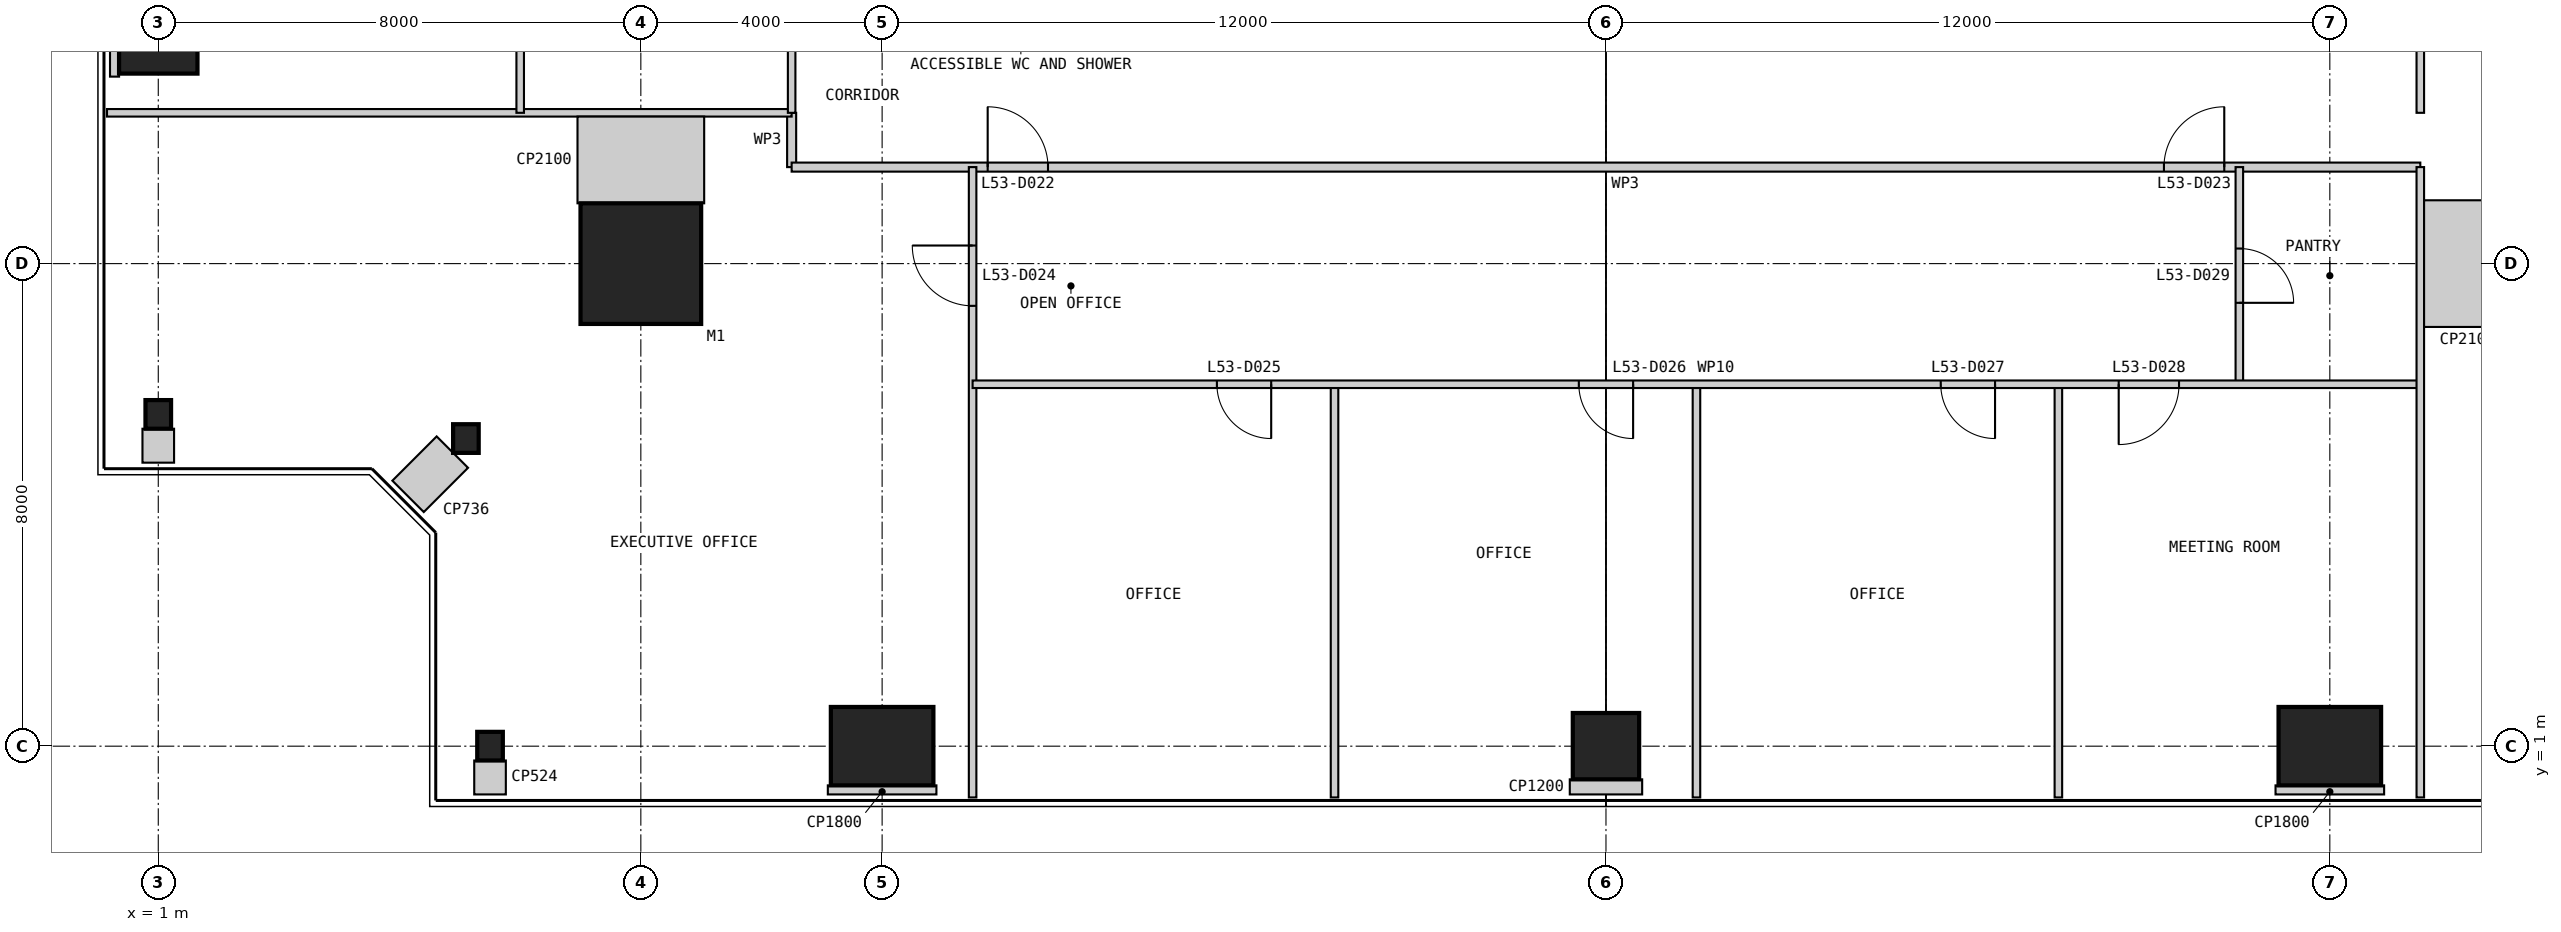
"""IFC4 building model, lengths in metres.
Left out: names, types, materials, properties, quantities, classifications, styles, units other than length and angle.
Written with IfcOpenShell. Run it as: python <this file> out.ifc"""

import sys

from ifc_helpers import new_model, si_unit, direction, frame, frame_2d, origin, origin_2d, place, context, subcontext, project, spatial, rectangle, i_section, extrude, element, fill, save


model = new_model("IFC4")
c1 = context("Model", 3, precision=1e-05, world=origin(), true_north=direction((0.0, 1.0)))
c2 = subcontext(c1, "Body", "Model", "MODEL_VIEW")
j1 = project(units=[si_unit("LENGTHUNIT", "METRE"), si_unit("PLANEANGLEUNIT", "RADIAN")], contexts=[c1])
p1 = place(None, origin())
s1 = spatial("IfcSite", under=j1, at=p1, CompositionType="ELEMENT")
p2 = place(p1, origin())
s2 = spatial("IfcBuilding", under=s1, at=p2, CompositionType="ELEMENT")
p3 = place(p2, frame((0.0, 0.0, 225.8)))
s3 = spatial("IfcBuildingStorey", under=s2, at=p3, CompositionType="ELEMENT", Elevation=225.8)
p4 = place(p3, frame((9.0, 9.0, 0.0), z_axis=(0.0, 0.0, 1.0), x_axis=(1.0, 0.0, 0.0)))
e1 = element("IfcColumn", 1, at=p4, inside=s3, PredefinedType="COLUMN", context=c2, shape_type="SweptSolid", body=[
    extrude(rectangle(XDim=2.0, YDim=2.0, at=origin_2d()), origin(), (0.0, 0.0, 1.0), 4.0),
])
p5 = place(p3, frame((6.5, 1.0, 0.0), z_axis=(0.0, 0.0, 1.0), x_axis=(1.0, 0.0, 0.0)))
e2 = element("IfcColumn", 2, at=p5, inside=s3, PredefinedType="COLUMN", context=c2, shape_type="SweptSolid", body=[
    extrude(i_section(OverallWidth=0.424, OverallDepth=0.475, WebThickness=0.048, FlangeThickness=0.077, at=origin_2d()), origin(), (0.0, 0.0, 1.0), 4.0),
])
p6 = place(p3, frame((13.0, 1.0, 0.0), z_axis=(0.0, 0.0, 1.0), x_axis=(1.0, 0.0, 0.0)))
e3 = element("IfcColumn", 3, at=p6, inside=s3, PredefinedType="COLUMN", context=c2, shape_type="SweptSolid", body=[
    extrude(rectangle(XDim=1.7, YDim=1.3, at=origin_2d()), origin(), (0.0, 0.0, 1.0), 4.0),
])
p7 = place(p3, frame((25.0, 1.0, 0.0), z_axis=(0.0, 0.0, 1.0), x_axis=(1.0, 0.0, 0.0)))
e4 = element("IfcColumn", 4, at=p7, inside=s3, PredefinedType="COLUMN", context=c2, shape_type="SweptSolid", body=[
    extrude(rectangle(XDim=1.1, YDim=1.1, at=origin_2d()), origin(), (0.0, 0.0, 1.0), 4.0),
])
p8 = place(p3, frame((37.0, 1.0, 0.0), z_axis=(0.0, 0.0, 1.0), x_axis=(1.0, 0.0, 0.0)))
e5 = element("IfcColumn", 5, at=p8, inside=s3, PredefinedType="COLUMN", context=c2, shape_type="SweptSolid", body=[
    extrude(rectangle(XDim=1.7, YDim=1.3, at=origin_2d()), origin(), (0.0, 0.0, 1.0), 4.0),
])
p9 = place(p3, frame((1.0, 13.0, 0.0), z_axis=(0.0, 0.0, 1.0), x_axis=(1.0, 0.0, 0.0)))
e6 = element("IfcColumn", 6, at=p9, inside=s3, PredefinedType="COLUMN", context=c2, shape_type="SweptSolid", body=[
    extrude(rectangle(XDim=1.3, YDim=1.7, at=origin_2d()), origin(), (0.0, 0.0, 1.0), 4.0),
])
for number, where, z_axis, x_axis in (
    (7, (1.0, 6.5, 0.0), (0.0, 0.0, 1.0), (1.0, 0.0, 0.0)),
    (8, (6.1, 6.1, 0.0), (0.0, 0.0, 1.0), (1.0, 0.0, 0.0)),
):
    element("IfcColumn", number, at=place(p3, frame(where, z_axis=z_axis, x_axis=x_axis)), inside=s3, PredefinedType="COLUMN", context=c2, shape_type="SweptSolid", body=[
        extrude(i_section(OverallWidth=0.424, OverallDepth=0.475, WebThickness=0.048, FlangeThickness=0.077, at=origin_2d()), origin(), (0.0, 0.0, 1.0), 4.0),
    ])
p10 = place(p3, frame((11.5, 11.5, 0.0), z_axis=(0.0, 0.0, 1.0), x_axis=(0.0, -1.0, 0.0)))
e9 = element("IfcWall", 9, at=p10, inside=s3, PredefinedType="PARTITIONING", context=c2, shape_type="SweptSolid", body=[
    extrude(rectangle(XDim=0.9, YDim=0.15, at=frame_2d((0.45, 0.0))), origin(), (0.0, 0.0, 1.0), 3.85),
])
p11 = place(p3, frame((11.5, 10.6, 0.0), z_axis=(0.0, 0.0, 1.0), x_axis=(1.0, 0.0, 0.0)))
e10 = element("IfcWall", 10, at=p11, inside=s3, PredefinedType="PARTITIONING", context=c2, shape_type="SweptSolid", body=[
    extrude(rectangle(XDim=27.0, YDim=0.15, at=frame_2d((13.5, 0.0))), origin(), (0.0, 0.0, 1.0), 3.85),
])
p12 = place(p11, frame((3.25, 0.0, 0.0)))
e11 = element("IfcOpeningElement", 11, at=p12, cuts=e10, PredefinedType="OPENING", context=c2, shape_type="SweptSolid", body=[
    extrude(rectangle(XDim=1.0, YDim=2.2, at=frame_2d((0.5, 1.1))), frame((0.0, 0.085, 0.0), z_axis=(0.0, -1.0, 0.0), x_axis=(1.0, 0.0, 0.0)), (0.0, 0.0, 1.0), 0.17),
])
p13 = place(p11, frame((22.75, 0.0, 0.0)))
e12 = element("IfcOpeningElement", 12, at=p13, cuts=e10, PredefinedType="OPENING", context=c2, shape_type="SweptSolid", body=[
    extrude(rectangle(XDim=1.0, YDim=2.2, at=frame_2d((0.5, 1.1))), frame((0.0, 0.085, 0.0), z_axis=(0.0, -1.0, 0.0), x_axis=(1.0, 0.0, 0.0)), (0.0, 0.0, 1.0), 0.17),
])
p14 = place(p3, frame((0.15, 11.5, 0.0), z_axis=(0.0, 0.0, 1.0), x_axis=(1.0, 0.0, 0.0)))
e13 = element("IfcWall", 13, at=p14, inside=s3, PredefinedType="PARTITIONING", context=c2, shape_type="SweptSolid", body=[
    extrude(rectangle(XDim=11.35, YDim=0.125, at=frame_2d((5.675, 0.0))), origin(), (0.0, 0.0, 1.0), 3.85),
])
p15 = place(p3, frame((14.5, 0.15, 0.0), z_axis=(0.0, 0.0, 1.0), x_axis=(0.0, 1.0, 0.0)))
e14 = element("IfcWall", 14, at=p15, inside=s3, PredefinedType="PARTITIONING", context=c2, shape_type="SweptSolid", body=[
    extrude(rectangle(XDim=10.45, YDim=0.125, at=frame_2d((5.225, 0.0))), origin(), (0.0, 0.0, 1.0), 3.85),
])
p16 = place(p15, frame((8.15, 0.0, 0.0)))
e15 = element("IfcOpeningElement", 15, at=p16, cuts=e14, PredefinedType="OPENING", context=c2, shape_type="SweptSolid", body=[
    extrude(rectangle(XDim=1.0, YDim=2.2, at=frame_2d((0.5, 1.1))), frame((0.0, 0.073, 0.0), z_axis=(0.0, -1.0, 0.0), x_axis=(1.0, 0.0, 0.0)), (0.0, 0.0, 1.0), 0.145),
])
for number, where, z_axis, x_axis in (
    (16, (20.5, 0.15, 0.0), (0.0, 0.0, 1.0), (0.0, 1.0, 0.0)),
    (17, (26.5, 0.15, 0.0), (0.0, 0.0, 1.0), (0.0, 1.0, 0.0)),
    (18, (32.5, 0.15, 0.0), (0.0, 0.0, 1.0), (0.0, 1.0, 0.0)),
):
    element("IfcWall", number, at=place(p3, frame(where, z_axis=z_axis, x_axis=x_axis)), inside=s3, PredefinedType="PARTITIONING", context=c2, shape_type="SweptSolid", body=[
        extrude(rectangle(XDim=6.85, YDim=0.125, at=frame_2d((3.425, 0.0))), origin(), (0.0, 0.0, 1.0), 3.85),
    ])
p17 = place(p3, frame((35.5, 7.0, 0.0), z_axis=(0.0, 0.0, 1.0), x_axis=(0.0, 1.0, 0.0)))
e19 = element("IfcWall", 19, at=p17, inside=s3, PredefinedType="PARTITIONING", context=c2, shape_type="SweptSolid", body=[
    extrude(rectangle(XDim=3.6, YDim=0.125, at=frame_2d((1.8, 0.0))), origin(), (0.0, 0.0, 1.0), 3.85),
])
p18 = place(p17, frame((1.35, 0.0, 0.0)))
e20 = element("IfcOpeningElement", 20, at=p18, cuts=e19, PredefinedType="OPENING", context=c2, shape_type="SweptSolid", body=[
    extrude(rectangle(XDim=0.9, YDim=2.2, at=frame_2d((0.45, 1.1))), frame((0.0, 0.073, 0.0), z_axis=(0.0, -1.0, 0.0), x_axis=(1.0, 0.0, 0.0)), (0.0, 0.0, 1.0), 0.145),
])
p19 = place(p3, frame((14.5, 7.0, 0.0), z_axis=(0.0, 0.0, 1.0), x_axis=(1.0, 0.0, 0.0)))
e21 = element("IfcWall", 21, at=p19, inside=s3, PredefinedType="PARTITIONING", context=c2, shape_type="SweptSolid", body=[
    extrude(rectangle(XDim=24.0, YDim=0.125, at=frame_2d((12.0, 0.0))), origin(), (0.0, 0.0, 1.0), 3.85),
])
p20 = place(p19, frame((4.05, 0.0, 0.0)))
e22 = element("IfcOpeningElement", 22, at=p20, cuts=e21, PredefinedType="OPENING", context=c2, shape_type="SweptSolid", body=[
    extrude(rectangle(XDim=0.9, YDim=2.2, at=frame_2d((0.45, 1.1))), frame((0.0, 0.073, 0.0), z_axis=(0.0, -1.0, 0.0), x_axis=(1.0, 0.0, 0.0)), (0.0, 0.0, 1.0), 0.145),
])
p21 = place(p19, frame((10.05, 0.0, 0.0)))
e23 = element("IfcOpeningElement", 23, at=p21, cuts=e21, PredefinedType="OPENING", context=c2, shape_type="SweptSolid", body=[
    extrude(rectangle(XDim=0.9, YDim=2.2, at=frame_2d((0.45, 1.1))), frame((0.0, 0.073, 0.0), z_axis=(0.0, -1.0, 0.0), x_axis=(1.0, 0.0, 0.0)), (0.0, 0.0, 1.0), 0.145),
])
p22 = place(p19, frame((16.05, 0.0, 0.0)))
e24 = element("IfcOpeningElement", 24, at=p22, cuts=e21, PredefinedType="OPENING", context=c2, shape_type="SweptSolid", body=[
    extrude(rectangle(XDim=0.9, YDim=2.2, at=frame_2d((0.45, 1.1))), frame((0.0, 0.073, 0.0), z_axis=(0.0, -1.0, 0.0), x_axis=(1.0, 0.0, 0.0)), (0.0, 0.0, 1.0), 0.145),
])
p23 = place(p19, frame((19.0, 0.0, 0.0)))
e25 = element("IfcOpeningElement", 25, at=p23, cuts=e21, PredefinedType="OPENING", context=c2, shape_type="SweptSolid", body=[
    extrude(rectangle(XDim=1.0, YDim=2.2, at=frame_2d((0.5, 1.1))), frame((0.0, 0.073, 0.0), z_axis=(0.0, -1.0, 0.0), x_axis=(1.0, 0.0, 0.0)), (0.0, 0.0, 1.0), 0.145),
])
p24 = place(p3, frame((38.5, 0.15, 0.0), z_axis=(0.0, 0.0, 1.0), x_axis=(0.0, 1.0, 0.0)))
e26 = element("IfcWall", 26, at=p24, inside=s3, PredefinedType="PARTITIONING", context=c2, shape_type="SweptSolid", body=[
    extrude(rectangle(XDim=10.45, YDim=0.125, at=frame_2d((5.225, 0.0))), origin(), (0.0, 0.0, 1.0), 3.85),
])
p25 = place(p3, frame((38.5, 11.5, 0.0), z_axis=(0.0, 0.0, 1.0), x_axis=(0.0, 1.0, 0.0)))
e27 = element("IfcWall", 27, at=p25, inside=s3, PredefinedType="PARTITIONING", context=c2, shape_type="SweptSolid", body=[
    extrude(rectangle(XDim=3.0, YDim=0.125, at=frame_2d((1.5, 0.0))), origin(), (0.0, 0.0, 1.0), 3.85),
])
p26 = place(p3, frame((7.0, 35.5, 0.0), z_axis=(0.0, 0.0, 1.0), x_axis=(0.0, -1.0, 0.0)))
e28 = element("IfcWall", 28, at=p26, inside=s3, PredefinedType="PARTITIONING", context=c2, shape_type="SweptSolid", body=[
    extrude(rectangle(XDim=24.0, YDim=0.125, at=frame_2d((12.0, 0.0))), origin(), (0.0, 0.0, 1.0), 3.238),
])
p27 = place(p26, frame((4.05, 0.0, 0.0)))
e29 = element("IfcOpeningElement", 29, at=p27, cuts=e28, PredefinedType="OPENING", context=c2, shape_type="SweptSolid", body=[
    extrude(rectangle(XDim=0.9, YDim=2.2, at=frame_2d((0.45, 1.1))), frame((0.0, 0.073, 0.0), z_axis=(0.0, -1.0, 0.0), x_axis=(1.0, 0.0, 0.0)), (0.0, 0.0, 1.0), 0.145),
])
p28 = place(p26, frame((10.05, 0.0, 0.0)))
e30 = element("IfcOpeningElement", 30, at=p28, cuts=e28, PredefinedType="OPENING", context=c2, shape_type="SweptSolid", body=[
    extrude(rectangle(XDim=0.9, YDim=2.2, at=frame_2d((0.45, 1.1))), frame((0.0, 0.073, 0.0), z_axis=(0.0, -1.0, 0.0), x_axis=(1.0, 0.0, 0.0)), (0.0, 0.0, 1.0), 0.145),
])
p29 = place(p26, frame((16.05, 0.0, 0.0)))
e31 = element("IfcOpeningElement", 31, at=p29, cuts=e28, PredefinedType="OPENING", context=c2, shape_type="SweptSolid", body=[
    extrude(rectangle(XDim=0.9, YDim=2.2, at=frame_2d((0.45, 1.1))), frame((0.0, 0.073, 0.0), z_axis=(0.0, -1.0, 0.0), x_axis=(1.0, 0.0, 0.0)), (0.0, 0.0, 1.0), 0.145),
])
p30 = place(p26, frame((19.0, 0.0, 0.0)))
e32 = element("IfcOpeningElement", 32, at=p30, cuts=e28, PredefinedType="OPENING", context=c2, shape_type="SweptSolid", body=[
    extrude(rectangle(XDim=1.0, YDim=2.2, at=frame_2d((0.5, 1.1))), frame((0.0, 0.073, 0.0), z_axis=(0.0, -1.0, 0.0), x_axis=(1.0, 0.0, 0.0)), (0.0, 0.0, 1.0), 0.145),
])
p31 = place(p3, frame((11.5, 14.5, 0.0), z_axis=(0.0, 0.0, 1.0), x_axis=(0.0, -1.0, 0.0)))
e33 = element("IfcWall", 33, at=p31, inside=s3, PredefinedType="PARTITIONING", context=c2, shape_type="SweptSolid", body=[
    extrude(rectangle(XDim=3.0, YDim=0.125, at=frame_2d((1.5, 0.0))), origin(), (0.0, 0.0, 1.0), 3.85),
])
p32 = place(p3, frame((9.0, 11.438, 0.0), z_axis=(0.0, 0.0, 1.0), x_axis=(0.0, -1.0, 0.0)))
e34 = element("IfcWall", 34, at=p32, inside=s3, PredefinedType="PARTITIONING", context=c2, shape_type="SweptSolid", body=[
    extrude(rectangle(XDim=1.438, YDim=2.1, at=frame_2d((0.719, 0.0))), origin(), (0.0, 0.0, 1.0), 3.85),
])
p33 = place(p3, frame((6.5, 0.2, 0.0), z_axis=(0.0, 0.0, 1.0), x_axis=(0.0, 1.0, 0.0)))
e35 = element("IfcWall", 35, at=p33, inside=s3, PredefinedType="PARTITIONING", context=c2, shape_type="SweptSolid", body=[
    extrude(rectangle(XDim=0.562, YDim=0.524, at=frame_2d((0.281, 0.0))), origin(), (0.0, 0.0, 1.0), 3.85),
])
p34 = place(p3, frame((13.0, 0.2, 0.0), z_axis=(0.0, 0.0, 1.0), x_axis=(0.0, 1.0, 0.0)))
e36 = element("IfcWall", 36, at=p34, inside=s3, PredefinedType="PARTITIONING", context=c2, shape_type="SweptSolid", body=[
    extrude(rectangle(XDim=0.15, YDim=1.8, at=frame_2d((0.075, 0.0))), origin(), (0.0, 0.0, 1.0), 3.85),
])
p35 = place(p3, frame((1.0, 5.7, 0.0), z_axis=(0.0, 0.0, 1.0), x_axis=(0.0, 1.0, 0.0)))
e37 = element("IfcWall", 37, at=p35, inside=s3, PredefinedType="PARTITIONING", context=c2, shape_type="SweptSolid", body=[
    extrude(rectangle(XDim=0.562, YDim=0.524, at=frame_2d((0.281, 0.0))), origin(), (0.0, 0.0, 1.0), 3.85),
])
p36 = place(p3, frame((5.141, 5.141, 0.0), z_axis=(0.0, 0.0, 1.0), x_axis=(0.707106781187, 0.707106781187, 0.0)))
e38 = element("IfcWall", 38, at=p36, inside=s3, PredefinedType="PARTITIONING", context=c2, shape_type="SweptSolid", body=[
    extrude(rectangle(XDim=1.038, YDim=0.736, at=frame_2d((0.519, 0.0))), origin(), (0.0, 0.0, 1.0), 3.85),
])
p37 = place(p3, frame((25.0, 0.2, 0.0), z_axis=(0.0, 0.0, 1.0), x_axis=(0.0, 1.0, 0.0)))
e39 = element("IfcWall", 39, at=p37, inside=s3, PredefinedType="PARTITIONING", context=c2, shape_type="SweptSolid", body=[
    extrude(rectangle(XDim=0.25, YDim=1.2, at=frame_2d((0.125, 0.0))), origin(), (0.0, 0.0, 1.0), 3.85),
])
p38 = place(p3, frame((37.0, 0.2, 0.0), z_axis=(0.0, 0.0, 1.0), x_axis=(0.0, 1.0, 0.0)))
e40 = element("IfcWall", 40, at=p38, inside=s3, PredefinedType="PARTITIONING", context=c2, shape_type="SweptSolid", body=[
    extrude(rectangle(XDim=0.15, YDim=1.8, at=frame_2d((0.075, 0.0))), origin(), (0.0, 0.0, 1.0), 3.85),
])
p39 = place(p3, frame((38.562, 9.0, 0.0), z_axis=(0.0, 0.0, 1.0), x_axis=(1.0, 0.0, 0.0)))
e41 = element("IfcWall", 41, at=p39, inside=s3, PredefinedType="PARTITIONING", context=c2, shape_type="SweptSolid", body=[
    extrude(rectangle(XDim=1.438, YDim=2.1, at=frame_2d((0.719, 0.0))), origin(), (0.0, 0.0, 1.0), 3.85),
])
p40 = place(p3, frame((0.2, 13.0, 0.0), z_axis=(0.0, 0.0, 1.0), x_axis=(1.0, 0.0, 0.0)))
e42 = element("IfcWall", 42, at=p40, inside=s3, PredefinedType="PARTITIONING", context=c2, shape_type="SweptSolid", body=[
    extrude(rectangle(XDim=0.15, YDim=1.8, at=frame_2d((0.075, 0.0))), origin(), (0.0, 0.0, 1.0), 3.85),
])
p41 = place(p12, origin())
e43 = element("IfcDoor", 43, at=p41, inside=s3, OperationType="SINGLE_SWING_LEFT", PredefinedType="DOOR", context=c2, shape_type="SweptSolid", body=[
    extrude(rectangle(XDim=1.0, YDim=2.2, at=frame_2d((0.5, 1.1))), frame((0.0, 0.025, 0.0), z_axis=(0.0, -1.0, 0.0), x_axis=(1.0, 0.0, 0.0)), (0.0, 0.0, 1.0), 0.05),
])
fill(e11, e43)
p42 = place(p13, origin())
e44 = element("IfcDoor", 44, at=p42, inside=s3, OperationType="SINGLE_SWING_RIGHT", PredefinedType="DOOR", context=c2, shape_type="SweptSolid", body=[
    extrude(rectangle(XDim=1.0, YDim=2.2, at=frame_2d((0.5, 1.1))), frame((0.0, 0.025, 0.0), z_axis=(0.0, -1.0, 0.0), x_axis=(1.0, 0.0, 0.0)), (0.0, 0.0, 1.0), 0.05),
])
fill(e12, e44)
p43 = place(p16, origin())
e45 = element("IfcDoor", 45, at=p43, inside=s3, OperationType="SINGLE_SWING_RIGHT", PredefinedType="DOOR", context=c2, shape_type="SweptSolid", body=[
    extrude(rectangle(XDim=1.0, YDim=2.2, at=frame_2d((0.5, 1.1))), frame((0.0, 0.025, 0.0), z_axis=(0.0, -1.0, 0.0), x_axis=(1.0, 0.0, 0.0)), (0.0, 0.0, 1.0), 0.05),
])
fill(e15, e45)
p44 = place(p20, frame((0.9, 0.0, 0.0), z_axis=(0.0, 0.0, 1.0), x_axis=(-1.0, 0.0, 0.0)))
e46 = element("IfcDoor", 46, at=p44, inside=s3, OperationType="SINGLE_SWING_LEFT", PredefinedType="DOOR", context=c2, shape_type="SweptSolid", body=[
    extrude(rectangle(XDim=0.9, YDim=2.2, at=frame_2d((0.45, 1.1))), frame((0.0, 0.025, 0.0), z_axis=(0.0, -1.0, 0.0), x_axis=(1.0, 0.0, 0.0)), (0.0, 0.0, 1.0), 0.05),
])
fill(e22, e46)
p45 = place(p21, frame((0.9, 0.0, 0.0), z_axis=(0.0, 0.0, 1.0), x_axis=(-1.0, 0.0, 0.0)))
e47 = element("IfcDoor", 47, at=p45, inside=s3, OperationType="SINGLE_SWING_LEFT", PredefinedType="DOOR", context=c2, shape_type="SweptSolid", body=[
    extrude(rectangle(XDim=0.9, YDim=2.2, at=frame_2d((0.45, 1.1))), frame((0.0, 0.025, 0.0), z_axis=(0.0, -1.0, 0.0), x_axis=(1.0, 0.0, 0.0)), (0.0, 0.0, 1.0), 0.05),
])
fill(e23, e47)
p46 = place(p22, frame((0.9, 0.0, 0.0), z_axis=(0.0, 0.0, 1.0), x_axis=(-1.0, 0.0, 0.0)))
e48 = element("IfcDoor", 48, at=p46, inside=s3, OperationType="SINGLE_SWING_LEFT", PredefinedType="DOOR", context=c2, shape_type="SweptSolid", body=[
    extrude(rectangle(XDim=0.9, YDim=2.2, at=frame_2d((0.45, 1.1))), frame((0.0, 0.025, 0.0), z_axis=(0.0, -1.0, 0.0), x_axis=(1.0, 0.0, 0.0)), (0.0, 0.0, 1.0), 0.05),
])
fill(e24, e48)
p47 = place(p23, frame((1.0, 0.0, 0.0), z_axis=(0.0, 0.0, 1.0), x_axis=(-1.0, 0.0, 0.0)))
e49 = element("IfcDoor", 49, at=p47, inside=s3, OperationType="SINGLE_SWING_RIGHT", PredefinedType="DOOR", context=c2, shape_type="SweptSolid", body=[
    extrude(rectangle(XDim=1.0, YDim=2.2, at=frame_2d((0.5, 1.1))), frame((0.0, 0.025, 0.0), z_axis=(0.0, -1.0, 0.0), x_axis=(1.0, 0.0, 0.0)), (0.0, 0.0, 1.0), 0.05),
])
fill(e25, e49)
p48 = place(p18, frame((0.9, 0.0, 0.0), z_axis=(0.0, 0.0, 1.0), x_axis=(-1.0, 0.0, 0.0)))
e50 = element("IfcDoor", 50, at=p48, inside=s3, OperationType="SINGLE_SWING_RIGHT", PredefinedType="DOOR", context=c2, shape_type="SweptSolid", body=[
    extrude(rectangle(XDim=0.9, YDim=2.2, at=frame_2d((0.45, 1.1))), frame((0.0, 0.025, 0.0), z_axis=(0.0, -1.0, 0.0), x_axis=(1.0, 0.0, 0.0)), (0.0, 0.0, 1.0), 0.05),
])
fill(e20, e50)
save(model, sys.argv[1])
